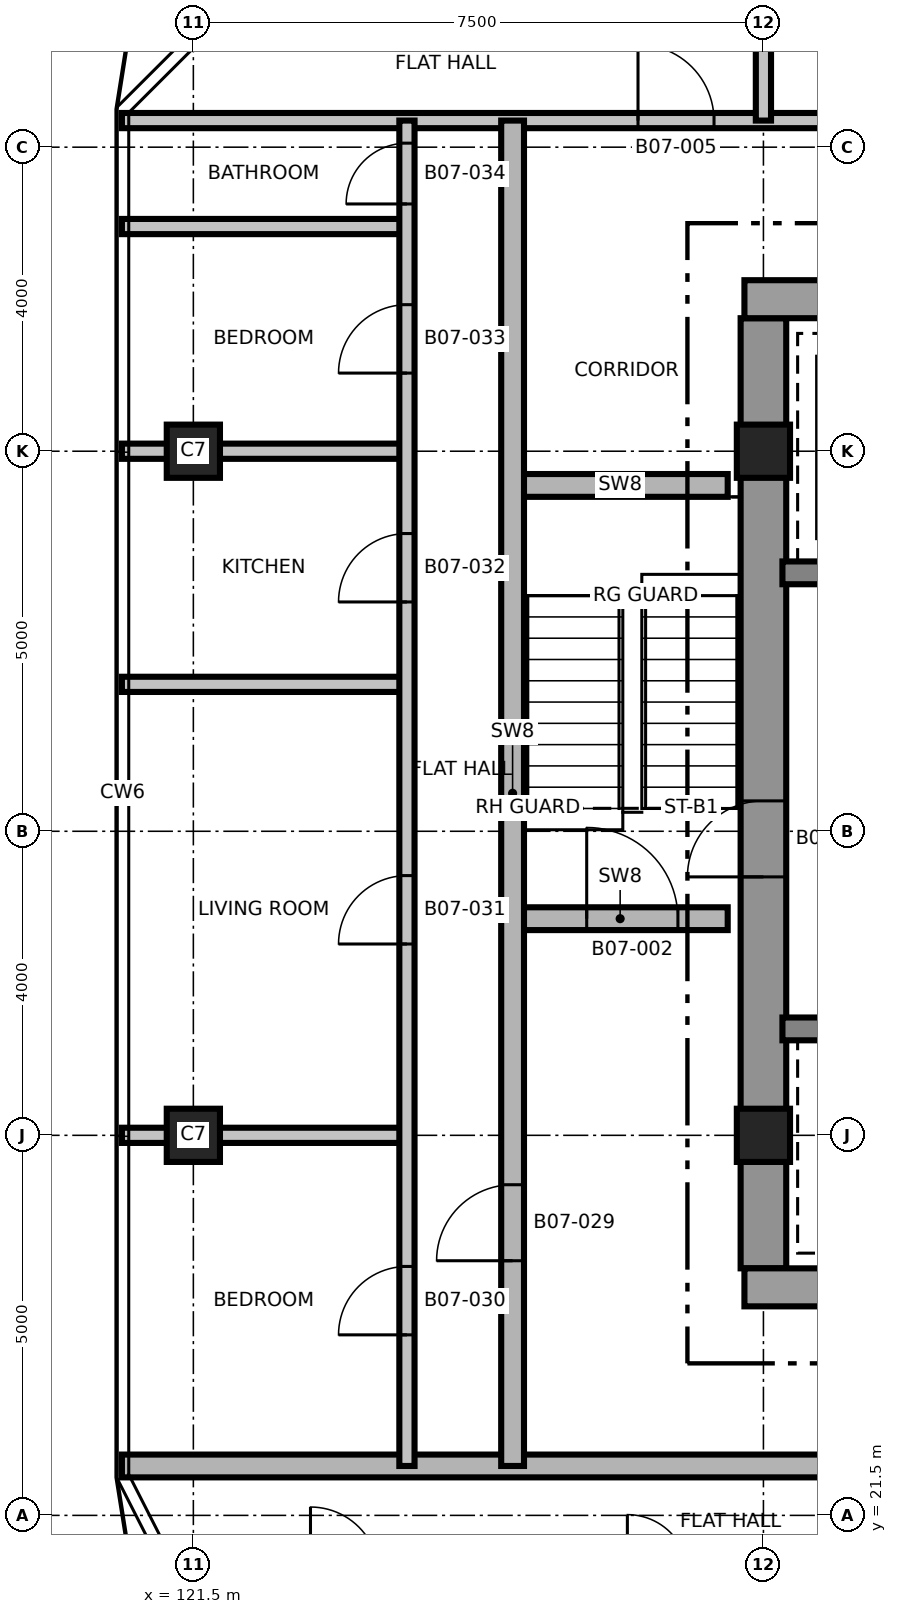
"""IFC4 building model, lengths in metres.
Left out: names, types, materials, properties, quantities, classifications, styles, units other than length and angle.
Written with IfcOpenShell. Run it as: python <this file> out.ifc"""

import sys

from ifc_helpers import new_model, si_unit, direction, frame, frame_2d, origin, origin_2d, place, context, subcontext, project, spatial, rectangle, extrude, element, fill, save


model = new_model("IFC4")
c1 = context("Model", 3, precision=1e-05, world=origin(), true_north=direction((0.0, 1.0)))
c2 = subcontext(c1, "Body", "Model", "MODEL_VIEW")
j1 = project(units=[si_unit("LENGTHUNIT", "METRE"), si_unit("PLANEANGLEUNIT", "RADIAN")], contexts=[c1])
p1 = place(None, origin())
s1 = spatial("IfcSite", under=j1, at=p1, CompositionType="ELEMENT")
p2 = place(p1, origin())
s2 = spatial("IfcBuilding", under=s1, at=p2, CompositionType="ELEMENT")
p3 = place(p2, frame((0.0, 0.0, 90.8)))
s3 = spatial("IfcBuildingStorey", under=s2, at=p3, CompositionType="ELEMENT", Elevation=90.8)
p4 = place(p3, frame((129.0, 24.75, 0.0), z_axis=(0.0, 0.0, 1.0), x_axis=(0.0, 1.0, 0.0)))
e1 = element("IfcWall", 1, at=p4, inside=s3, PredefinedType="SHEAR", context=c2, shape_type="SweptSolid", body=[
    extrude(rectangle(XDim=12.5, YDim=0.6, at=frame_2d((6.25, 0.0))), origin(), (0.0, 0.0, 1.0), 3.7),
])
p5 = place(p4, frame((5.15, 0.0, 0.0)))
e2 = element("IfcOpeningElement", 2, at=p5, cuts=e1, PredefinedType="OPENING", context=c2, shape_type="SweptSolid", body=[
    extrude(rectangle(XDim=1.0, YDim=2.1, at=frame_2d((0.5, 1.05))), frame((0.0, 0.31, 0.0), z_axis=(0.0, -1.0, 0.0), x_axis=(1.0, 0.0, 0.0)), (0.0, 0.0, 1.0), 0.62),
])
p6 = place(p3, frame((128.75, 24.5, 0.0), z_axis=(0.0, 0.0, 1.0), x_axis=(1.0, 0.0, 0.0)))
e3 = element("IfcWall", 3, at=p6, inside=s3, PredefinedType="SHEAR", context=c2, shape_type="SweptSolid", body=[
    extrude(rectangle(XDim=15.0, YDim=0.5, at=frame_2d((7.5, 0.0))), origin(), (0.0, 0.0, 1.0), 3.7),
])
p7 = place(p6, frame((9.65, 0.0, 0.0)))
e4 = element("IfcOpeningElement", 4, at=p7, cuts=e3, PredefinedType="OPENING", context=c2, shape_type="SweptSolid", body=[
    extrude(rectangle(XDim=1.5, YDim=2.1, at=frame_2d((0.75, 1.05))), frame((0.0, 0.26, 0.0), z_axis=(0.0, -1.0, 0.0), x_axis=(1.0, 0.0, 0.0)), (0.0, 0.0, 1.0), 0.52),
])
p8 = place(p6, frame((1.25, 0.0, 0.0)))
e5 = element("IfcOpeningElement", 5, at=p8, cuts=e3, PredefinedType="OPENING", context=c2, shape_type="SweptSolid", body=[
    extrude(rectangle(XDim=0.9, YDim=2.1, at=frame_2d((0.45, 1.05))), frame((0.0, 0.26, 0.0), z_axis=(0.0, -1.0, 0.0), x_axis=(1.0, 0.0, 0.0)), (0.0, 0.0, 1.0), 0.52),
])
p9 = place(p3, frame((128.75, 37.5, 0.0), z_axis=(0.0, 0.0, 1.0), x_axis=(1.0, 0.0, 0.0)))
e6 = element("IfcWall", 6, at=p9, inside=s3, PredefinedType="SHEAR", context=c2, shape_type="SweptSolid", body=[
    extrude(rectangle(XDim=15.0, YDim=0.5, at=frame_2d((7.5, 0.0))), origin(), (0.0, 0.0, 1.0), 3.7),
])
p10 = place(p9, frame((9.65, 0.0, 0.0)))
e7 = element("IfcOpeningElement", 7, at=p10, cuts=e6, PredefinedType="OPENING", context=c2, shape_type="SweptSolid", body=[
    extrude(rectangle(XDim=1.5, YDim=2.1, at=frame_2d((0.75, 1.05))), frame((0.0, 0.26, 0.0), z_axis=(0.0, -1.0, 0.0), x_axis=(1.0, 0.0, 0.0)), (0.0, 0.0, 1.0), 0.52),
])
p11 = place(p9, frame((12.85, 0.0, 0.0)))
e8 = element("IfcOpeningElement", 8, at=p11, cuts=e6, PredefinedType="OPENING", context=c2, shape_type="SweptSolid", body=[
    extrude(rectangle(XDim=0.9, YDim=2.1, at=frame_2d((0.45, 1.05))), frame((0.0, 0.26, 0.0), z_axis=(0.0, -1.0, 0.0), x_axis=(1.0, 0.0, 0.0)), (0.0, 0.0, 1.0), 0.52),
])
p12 = place(p9, frame((3.8, 0.0, 0.0)))
e9 = element("IfcOpeningElement", 9, at=p12, cuts=e6, PredefinedType="OPENING", context=c2, shape_type="SweptSolid", body=[
    extrude(rectangle(XDim=0.9, YDim=2.1, at=frame_2d((0.45, 1.05))), frame((0.0, 0.26, 0.0), z_axis=(0.0, -1.0, 0.0), x_axis=(1.0, 0.0, 0.0)), (0.0, 0.0, 1.0), 0.52),
])
p13 = place(p9, frame((6.7, 0.0, 0.0)))
e10 = element("IfcOpeningElement", 10, at=p13, cuts=e6, PredefinedType="OPENING", context=c2, shape_type="SweptSolid", body=[
    extrude(rectangle(XDim=0.9, YDim=2.1, at=frame_2d((0.45, 1.05))), frame((0.0, 0.26, 0.0), z_axis=(0.0, -1.0, 0.0), x_axis=(1.0, 0.0, 0.0)), (0.0, 0.0, 1.0), 0.52),
])
p14 = place(p3, frame((129.25, 27.9, 0.0), z_axis=(0.0, 0.0, 1.0), x_axis=(1.0, 0.0, 0.0)))
e11 = element("IfcWall", 11, at=p14, inside=s3, PredefinedType="SHEAR", context=c2, shape_type="SweptSolid", body=[
    extrude(rectangle(XDim=2.7, YDim=0.3, at=frame_2d((1.35, 0.0))), origin(), (0.0, 0.0, 1.0), 3.7),
])
p15 = place(p3, frame((129.25, 33.9, 0.0), z_axis=(0.0, 0.0, 1.0), x_axis=(1.0, 0.0, 0.0)))
e12 = element("IfcWall", 12, at=p15, inside=s3, PredefinedType="SHEAR", context=c2, shape_type="SweptSolid", body=[
    extrude(rectangle(XDim=2.7, YDim=0.3, at=frame_2d((1.35, 0.0))), origin(), (0.0, 0.0, 1.0), 3.7),
])
p16 = place(p15, frame((1.05, 0.0, 0.0)))
e13 = element("IfcOpeningElement", 13, at=p16, cuts=e12, PredefinedType="OPENING", context=c2, shape_type="SweptSolid", body=[
    extrude(rectangle(XDim=1.3, YDim=2.4, at=frame_2d((0.65, 1.2))), frame((0.0, 0.16, 0.0), z_axis=(0.0, -1.0, 0.0), x_axis=(1.0, 0.0, 0.0)), (0.0, 0.0, 1.0), 0.32),
])
for number, where, z_axis, x_axis in (
    (14, (121.5, 26.5, 0.0), (0.0, 0.0, 1.0), (1.0, 0.0, 0.0)),
    (15, (129.0, 26.5, 0.0), (0.0, 0.0, 1.0), (1.0, 0.0, 0.0)),
    (16, (121.5, 35.5, 0.0), (0.0, 0.0, 1.0), (1.0, 0.0, 0.0)),
    (17, (129.0, 35.5, 0.0), (0.0, 0.0, 1.0), (1.0, 0.0, 0.0)),
):
    element("IfcColumn", number, at=place(p3, frame(where, z_axis=z_axis, x_axis=x_axis)), inside=s3, PredefinedType="COLUMN", context=c2, shape_type="SweptSolid", body=[
        extrude(rectangle(XDim=0.7, YDim=0.7, at=origin_2d()), origin(), (0.0, 0.0, 1.0), 3.7),
    ])
p17 = place(p3, frame((120.56, 22.15, 0.0), z_axis=(0.0, 0.0, 1.0), x_axis=(1.0, 0.0, 0.0)))
e18 = element("IfcWall", 18, at=p17, inside=s3, PredefinedType="SHEAR", context=c2, shape_type="SweptSolid", body=[
    extrude(rectangle(XDim=31.88, YDim=0.3, at=frame_2d((15.94, 0.0))), origin(), (0.0, 0.0, 1.0), 3.4),
])
p18 = place(p17, frame((22.19, 0.0, 0.0)))
e19 = element("IfcOpeningElement", 19, at=p18, cuts=e18, PredefinedType="OPENING", context=c2, shape_type="SweptSolid", body=[
    extrude(rectangle(XDim=1.0, YDim=2.1, at=frame_2d((0.5, 1.05))), frame((0.0, 0.16, 0.0), z_axis=(0.0, -1.0, 0.0), x_axis=(1.0, 0.0, 0.0)), (0.0, 0.0, 1.0), 0.32),
])
p19 = place(p17, frame((10.54, 0.0, 0.0)))
e20 = element("IfcOpeningElement", 20, at=p19, cuts=e18, PredefinedType="OPENING", context=c2, shape_type="SweptSolid", body=[
    extrude(rectangle(XDim=1.0, YDim=2.1, at=frame_2d((0.5, 1.05))), frame((0.0, 0.16, 0.0), z_axis=(0.0, -1.0, 0.0), x_axis=(1.0, 0.0, 0.0)), (0.0, 0.0, 1.0), 0.32),
])
p20 = place(p17, frame((24.09, 0.0, 0.0)))
e21 = element("IfcOpeningElement", 21, at=p20, cuts=e18, PredefinedType="OPENING", context=c2, shape_type="SweptSolid", body=[
    extrude(rectangle(XDim=1.0, YDim=2.1, at=frame_2d((0.5, 1.05))), frame((0.0, 0.16, 0.0), z_axis=(0.0, -1.0, 0.0), x_axis=(1.0, 0.0, 0.0)), (0.0, 0.0, 1.0), 0.32),
])
p21 = place(p17, frame((16.19, 0.0, 0.0)))
e22 = element("IfcOpeningElement", 22, at=p21, cuts=e18, PredefinedType="OPENING", context=c2, shape_type="SweptSolid", body=[
    extrude(rectangle(XDim=0.9, YDim=2.1, at=frame_2d((0.45, 1.05))), frame((0.0, 0.16, 0.0), z_axis=(0.0, -1.0, 0.0), x_axis=(1.0, 0.0, 0.0)), (0.0, 0.0, 1.0), 0.32),
])
p22 = place(p3, frame((120.56, 26.5, 0.0), z_axis=(0.0, 0.0, 1.0), x_axis=(1.0, 0.0, 0.0)))
e23 = element("IfcWall", 23, at=p22, inside=s3, PredefinedType="PARTITIONING", context=c2, shape_type="SweptSolid", body=[
    extrude(rectangle(XDim=3.75, YDim=0.2, at=frame_2d((1.875, 0.0))), origin(), (0.0, 0.0, 1.0), 3.4),
])
p23 = place(p3, frame((125.7, 29.35, 0.0), z_axis=(0.0, 0.0, 1.0), x_axis=(1.0, 0.0, 0.0)))
e24 = element("IfcWall", 24, at=p23, inside=s3, PredefinedType="SHEAR", context=c2, shape_type="SweptSolid", body=[
    extrude(rectangle(XDim=2.83, YDim=0.3, at=frame_2d((1.415, 0.0))), origin(), (0.0, 0.0, 1.0), 3.4),
])
p24 = place(p23, frame((0.975, 0.0, 0.0)))
e25 = element("IfcOpeningElement", 25, at=p24, cuts=e24, PredefinedType="OPENING", context=c2, shape_type="SweptSolid", body=[
    extrude(rectangle(XDim=1.2, YDim=2.1, at=frame_2d((0.6, 1.05))), frame((0.0, 0.16, 0.0), z_axis=(0.0, -1.0, 0.0), x_axis=(1.0, 0.0, 0.0)), (0.0, 0.0, 1.0), 0.32),
])
p25 = place(p3, frame((120.56, 32.433, 0.0), z_axis=(0.0, 0.0, 1.0), x_axis=(1.0, 0.0, 0.0)))
e26 = element("IfcWall", 26, at=p25, inside=s3, PredefinedType="PARTITIONING", context=c2, shape_type="SweptSolid", body=[
    extrude(rectangle(XDim=3.75, YDim=0.2, at=frame_2d((1.875, 0.0))), origin(), (0.0, 0.0, 1.0), 3.4),
])
p26 = place(p3, frame((125.7, 35.05, 0.0), z_axis=(0.0, 0.0, 1.0), x_axis=(1.0, 0.0, 0.0)))
e27 = element("IfcWall", 27, at=p26, inside=s3, PredefinedType="SHEAR", context=c2, shape_type="SweptSolid", body=[
    extrude(rectangle(XDim=2.83, YDim=0.3, at=frame_2d((1.415, 0.0))), origin(), (0.0, 0.0, 1.0), 3.4),
])
for number, where, z_axis, x_axis in (
    (28, (120.56, 35.5, 0.0), (0.0, 0.0, 1.0), (1.0, 0.0, 0.0)),
    (29, (120.56, 38.456, 0.0), (0.0, 0.0, 1.0), (1.0, 0.0, 0.0)),
):
    element("IfcWall", number, at=place(p3, frame(where, z_axis=z_axis, x_axis=x_axis)), inside=s3, PredefinedType="PARTITIONING", context=c2, shape_type="SweptSolid", body=[
        extrude(rectangle(XDim=3.75, YDim=0.2, at=frame_2d((1.875, 0.0))), origin(), (0.0, 0.0, 1.0), 3.4),
    ])
p27 = place(p3, frame((120.56, 39.85, 0.0), z_axis=(0.0, 0.0, 1.0), x_axis=(1.0, 0.0, 0.0)))
e30 = element("IfcWall", 30, at=p27, inside=s3, PredefinedType="PARTITIONING", context=c2, shape_type="SweptSolid", body=[
    extrude(rectangle(XDim=31.88, YDim=0.2, at=frame_2d((15.94, 0.0))), origin(), (0.0, 0.0, 1.0), 3.4),
])
p28 = place(p27, frame((6.79, 0.0, 0.0)))
e31 = element("IfcOpeningElement", 31, at=p28, cuts=e30, PredefinedType="OPENING", context=c2, shape_type="SweptSolid", body=[
    extrude(rectangle(XDim=1.0, YDim=2.1, at=frame_2d((0.5, 1.05))), frame((0.0, 0.11, 0.0), z_axis=(0.0, -1.0, 0.0), x_axis=(1.0, 0.0, 0.0)), (0.0, 0.0, 1.0), 0.22),
])
p29 = place(p27, frame((15.44, 0.0, 0.0)))
e32 = element("IfcOpeningElement", 32, at=p29, cuts=e30, PredefinedType="OPENING", context=c2, shape_type="SweptSolid", body=[
    extrude(rectangle(XDim=1.0, YDim=2.1, at=frame_2d((0.5, 1.05))), frame((0.0, 0.11, 0.0), z_axis=(0.0, -1.0, 0.0), x_axis=(1.0, 0.0, 0.0)), (0.0, 0.0, 1.0), 0.22),
])
p30 = place(p27, frame((24.09, 0.0, 0.0)))
e33 = element("IfcOpeningElement", 33, at=p30, cuts=e30, PredefinedType="OPENING", context=c2, shape_type="SweptSolid", body=[
    extrude(rectangle(XDim=1.0, YDim=2.1, at=frame_2d((0.5, 1.05))), frame((0.0, 0.11, 0.0), z_axis=(0.0, -1.0, 0.0), x_axis=(1.0, 0.0, 0.0)), (0.0, 0.0, 1.0), 0.22),
])
p31 = place(p3, frame((124.31, 22.15, 0.0), z_axis=(0.0, 0.0, 1.0), x_axis=(0.0, 1.0, 0.0)))
e34 = element("IfcWall", 34, at=p31, inside=s3, PredefinedType="PARTITIONING", context=c2, shape_type="SweptSolid", body=[
    extrude(rectangle(XDim=17.7, YDim=0.2, at=frame_2d((8.85, 0.0))), origin(), (0.0, 0.0, 1.0), 3.4),
])
p32 = place(p31, frame((1.725, 0.0, 0.0)))
e35 = element("IfcOpeningElement", 35, at=p32, cuts=e34, PredefinedType="OPENING", context=c2, shape_type="SweptSolid", body=[
    extrude(rectangle(XDim=0.9, YDim=2.1, at=frame_2d((0.45, 1.05))), frame((0.0, 0.11, 0.0), z_axis=(0.0, -1.0, 0.0), x_axis=(1.0, 0.0, 0.0)), (0.0, 0.0, 1.0), 0.22),
])
p33 = place(p31, frame((6.867, 0.0, 0.0)))
e36 = element("IfcOpeningElement", 36, at=p33, cuts=e34, PredefinedType="OPENING", context=c2, shape_type="SweptSolid", body=[
    extrude(rectangle(XDim=0.9, YDim=2.1, at=frame_2d((0.45, 1.05))), frame((0.0, 0.11, 0.0), z_axis=(0.0, -1.0, 0.0), x_axis=(1.0, 0.0, 0.0)), (0.0, 0.0, 1.0), 0.22),
])
p34 = place(p31, frame((11.367, 0.0, 0.0)))
e37 = element("IfcOpeningElement", 37, at=p34, cuts=e34, PredefinedType="OPENING", context=c2, shape_type="SweptSolid", body=[
    extrude(rectangle(XDim=0.9, YDim=2.1, at=frame_2d((0.45, 1.05))), frame((0.0, 0.11, 0.0), z_axis=(0.0, -1.0, 0.0), x_axis=(1.0, 0.0, 0.0)), (0.0, 0.0, 1.0), 0.22),
])
p35 = place(p31, frame((14.378, 0.0, 0.0)))
e38 = element("IfcOpeningElement", 38, at=p35, cuts=e34, PredefinedType="OPENING", context=c2, shape_type="SweptSolid", body=[
    extrude(rectangle(XDim=0.9, YDim=2.1, at=frame_2d((0.45, 1.05))), frame((0.0, 0.11, 0.0), z_axis=(0.0, -1.0, 0.0), x_axis=(1.0, 0.0, 0.0)), (0.0, 0.0, 1.0), 0.22),
])
p36 = place(p31, frame((16.603, 0.0, 0.0)))
e39 = element("IfcOpeningElement", 39, at=p36, cuts=e34, PredefinedType="OPENING", context=c2, shape_type="SweptSolid", body=[
    extrude(rectangle(XDim=0.8, YDim=2.1, at=frame_2d((0.4, 1.05))), frame((0.0, 0.11, 0.0), z_axis=(0.0, -1.0, 0.0), x_axis=(1.0, 0.0, 0.0)), (0.0, 0.0, 1.0), 0.22),
])
p37 = place(p3, frame((125.7, 22.15, 0.0), z_axis=(0.0, 0.0, 1.0), x_axis=(0.0, 1.0, 0.0)))
e40 = element("IfcWall", 40, at=p37, inside=s3, PredefinedType="SHEAR", context=c2, shape_type="SweptSolid", body=[
    extrude(rectangle(XDim=17.7, YDim=0.3, at=frame_2d((8.85, 0.0))), origin(), (0.0, 0.0, 1.0), 3.4),
])
p38 = place(p37, frame((2.7, 0.0, 0.0)))
e41 = element("IfcOpeningElement", 41, at=p38, cuts=e40, PredefinedType="OPENING", context=c2, shape_type="SweptSolid", body=[
    extrude(rectangle(XDim=1.0, YDim=2.1, at=frame_2d((0.5, 1.05))), frame((0.0, 0.16, 0.0), z_axis=(0.0, -1.0, 0.0), x_axis=(1.0, 0.0, 0.0)), (0.0, 0.0, 1.0), 0.32),
])
p39 = place(p3, frame((129.0, 39.85, 0.0), z_axis=(0.0, 0.0, 1.0), x_axis=(0.0, 1.0, 0.0)))
e42 = element("IfcWall", 42, at=p39, inside=s3, PredefinedType="PARTITIONING", context=c2, shape_type="SweptSolid", body=[
    extrude(rectangle(XDim=5.59, YDim=0.2, at=frame_2d((2.795, 0.0))), origin(), (0.0, 0.0, 1.0), 3.4),
])
p40 = place(p24, origin())
e43 = element("IfcDoor", 43, at=p40, inside=s3, OperationType="SINGLE_SWING_RIGHT", PredefinedType="DOOR", context=c2, shape_type="SweptSolid", body=[
    extrude(rectangle(XDim=1.2, YDim=2.1, at=frame_2d((0.6, 1.05))), frame((0.0, 0.025, 0.0), z_axis=(0.0, -1.0, 0.0), x_axis=(1.0, 0.0, 0.0)), (0.0, 0.0, 1.0), 0.05),
])
fill(e25, e43)
p41 = place(p28, origin())
e44 = element("IfcDoor", 44, at=p41, inside=s3, OperationType="SINGLE_SWING_LEFT", PredefinedType="DOOR", context=c2, shape_type="SweptSolid", body=[
    extrude(rectangle(XDim=1.0, YDim=2.1, at=frame_2d((0.5, 1.05))), frame((0.0, 0.025, 0.0), z_axis=(0.0, -1.0, 0.0), x_axis=(1.0, 0.0, 0.0)), (0.0, 0.0, 1.0), 0.05),
])
fill(e31, e44)
p42 = place(p38, origin())
e45 = element("IfcDoor", 45, at=p42, inside=s3, OperationType="SINGLE_SWING_LEFT", PredefinedType="DOOR", context=c2, shape_type="SweptSolid", body=[
    extrude(rectangle(XDim=1.0, YDim=2.1, at=frame_2d((0.5, 1.05))), frame((0.0, 0.025, 0.0), z_axis=(0.0, -1.0, 0.0), x_axis=(1.0, 0.0, 0.0)), (0.0, 0.0, 1.0), 0.05),
])
fill(e41, e45)
p43 = place(p32, origin())
e46 = element("IfcDoor", 46, at=p43, inside=s3, OperationType="SINGLE_SWING_RIGHT", PredefinedType="DOOR", context=c2, shape_type="SweptSolid", body=[
    extrude(rectangle(XDim=0.9, YDim=2.1, at=frame_2d((0.45, 1.05))), frame((0.0, 0.025, 0.0), z_axis=(0.0, -1.0, 0.0), x_axis=(1.0, 0.0, 0.0)), (0.0, 0.0, 1.0), 0.05),
])
fill(e35, e46)
p44 = place(p33, origin())
e47 = element("IfcDoor", 47, at=p44, inside=s3, OperationType="SINGLE_SWING_LEFT", PredefinedType="DOOR", context=c2, shape_type="SweptSolid", body=[
    extrude(rectangle(XDim=0.9, YDim=2.1, at=frame_2d((0.45, 1.05))), frame((0.0, 0.025, 0.0), z_axis=(0.0, -1.0, 0.0), x_axis=(1.0, 0.0, 0.0)), (0.0, 0.0, 1.0), 0.05),
])
fill(e36, e47)
p45 = place(p34, origin())
e48 = element("IfcDoor", 48, at=p45, inside=s3, OperationType="SINGLE_SWING_RIGHT", PredefinedType="DOOR", context=c2, shape_type="SweptSolid", body=[
    extrude(rectangle(XDim=0.9, YDim=2.1, at=frame_2d((0.45, 1.05))), frame((0.0, 0.025, 0.0), z_axis=(0.0, -1.0, 0.0), x_axis=(1.0, 0.0, 0.0)), (0.0, 0.0, 1.0), 0.05),
])
fill(e37, e48)
p46 = place(p35, origin())
e49 = element("IfcDoor", 49, at=p46, inside=s3, OperationType="SINGLE_SWING_LEFT", PredefinedType="DOOR", context=c2, shape_type="SweptSolid", body=[
    extrude(rectangle(XDim=0.9, YDim=2.1, at=frame_2d((0.45, 1.05))), frame((0.0, 0.025, 0.0), z_axis=(0.0, -1.0, 0.0), x_axis=(1.0, 0.0, 0.0)), (0.0, 0.0, 1.0), 0.05),
])
fill(e38, e49)
p47 = place(p36, origin())
e50 = element("IfcDoor", 50, at=p47, inside=s3, OperationType="SINGLE_SWING_RIGHT", PredefinedType="DOOR", context=c2, shape_type="SweptSolid", body=[
    extrude(rectangle(XDim=0.8, YDim=2.1, at=frame_2d((0.4, 1.05))), frame((0.0, 0.025, 0.0), z_axis=(0.0, -1.0, 0.0), x_axis=(1.0, 0.0, 0.0)), (0.0, 0.0, 1.0), 0.05),
])
fill(e39, e50)
p48 = place(p5, origin())
e51 = element("IfcDoor", 51, at=p48, inside=s3, OperationType="SINGLE_SWING_RIGHT", PredefinedType="DOOR", context=c2, shape_type="SweptSolid", body=[
    extrude(rectangle(XDim=1.0, YDim=2.1, at=frame_2d((0.5, 1.05))), frame((0.0, 0.025, 0.0), z_axis=(0.0, -1.0, 0.0), x_axis=(1.0, 0.0, 0.0)), (0.0, 0.0, 1.0), 0.05),
])
fill(e2, e51)
save(model, sys.argv[1])
